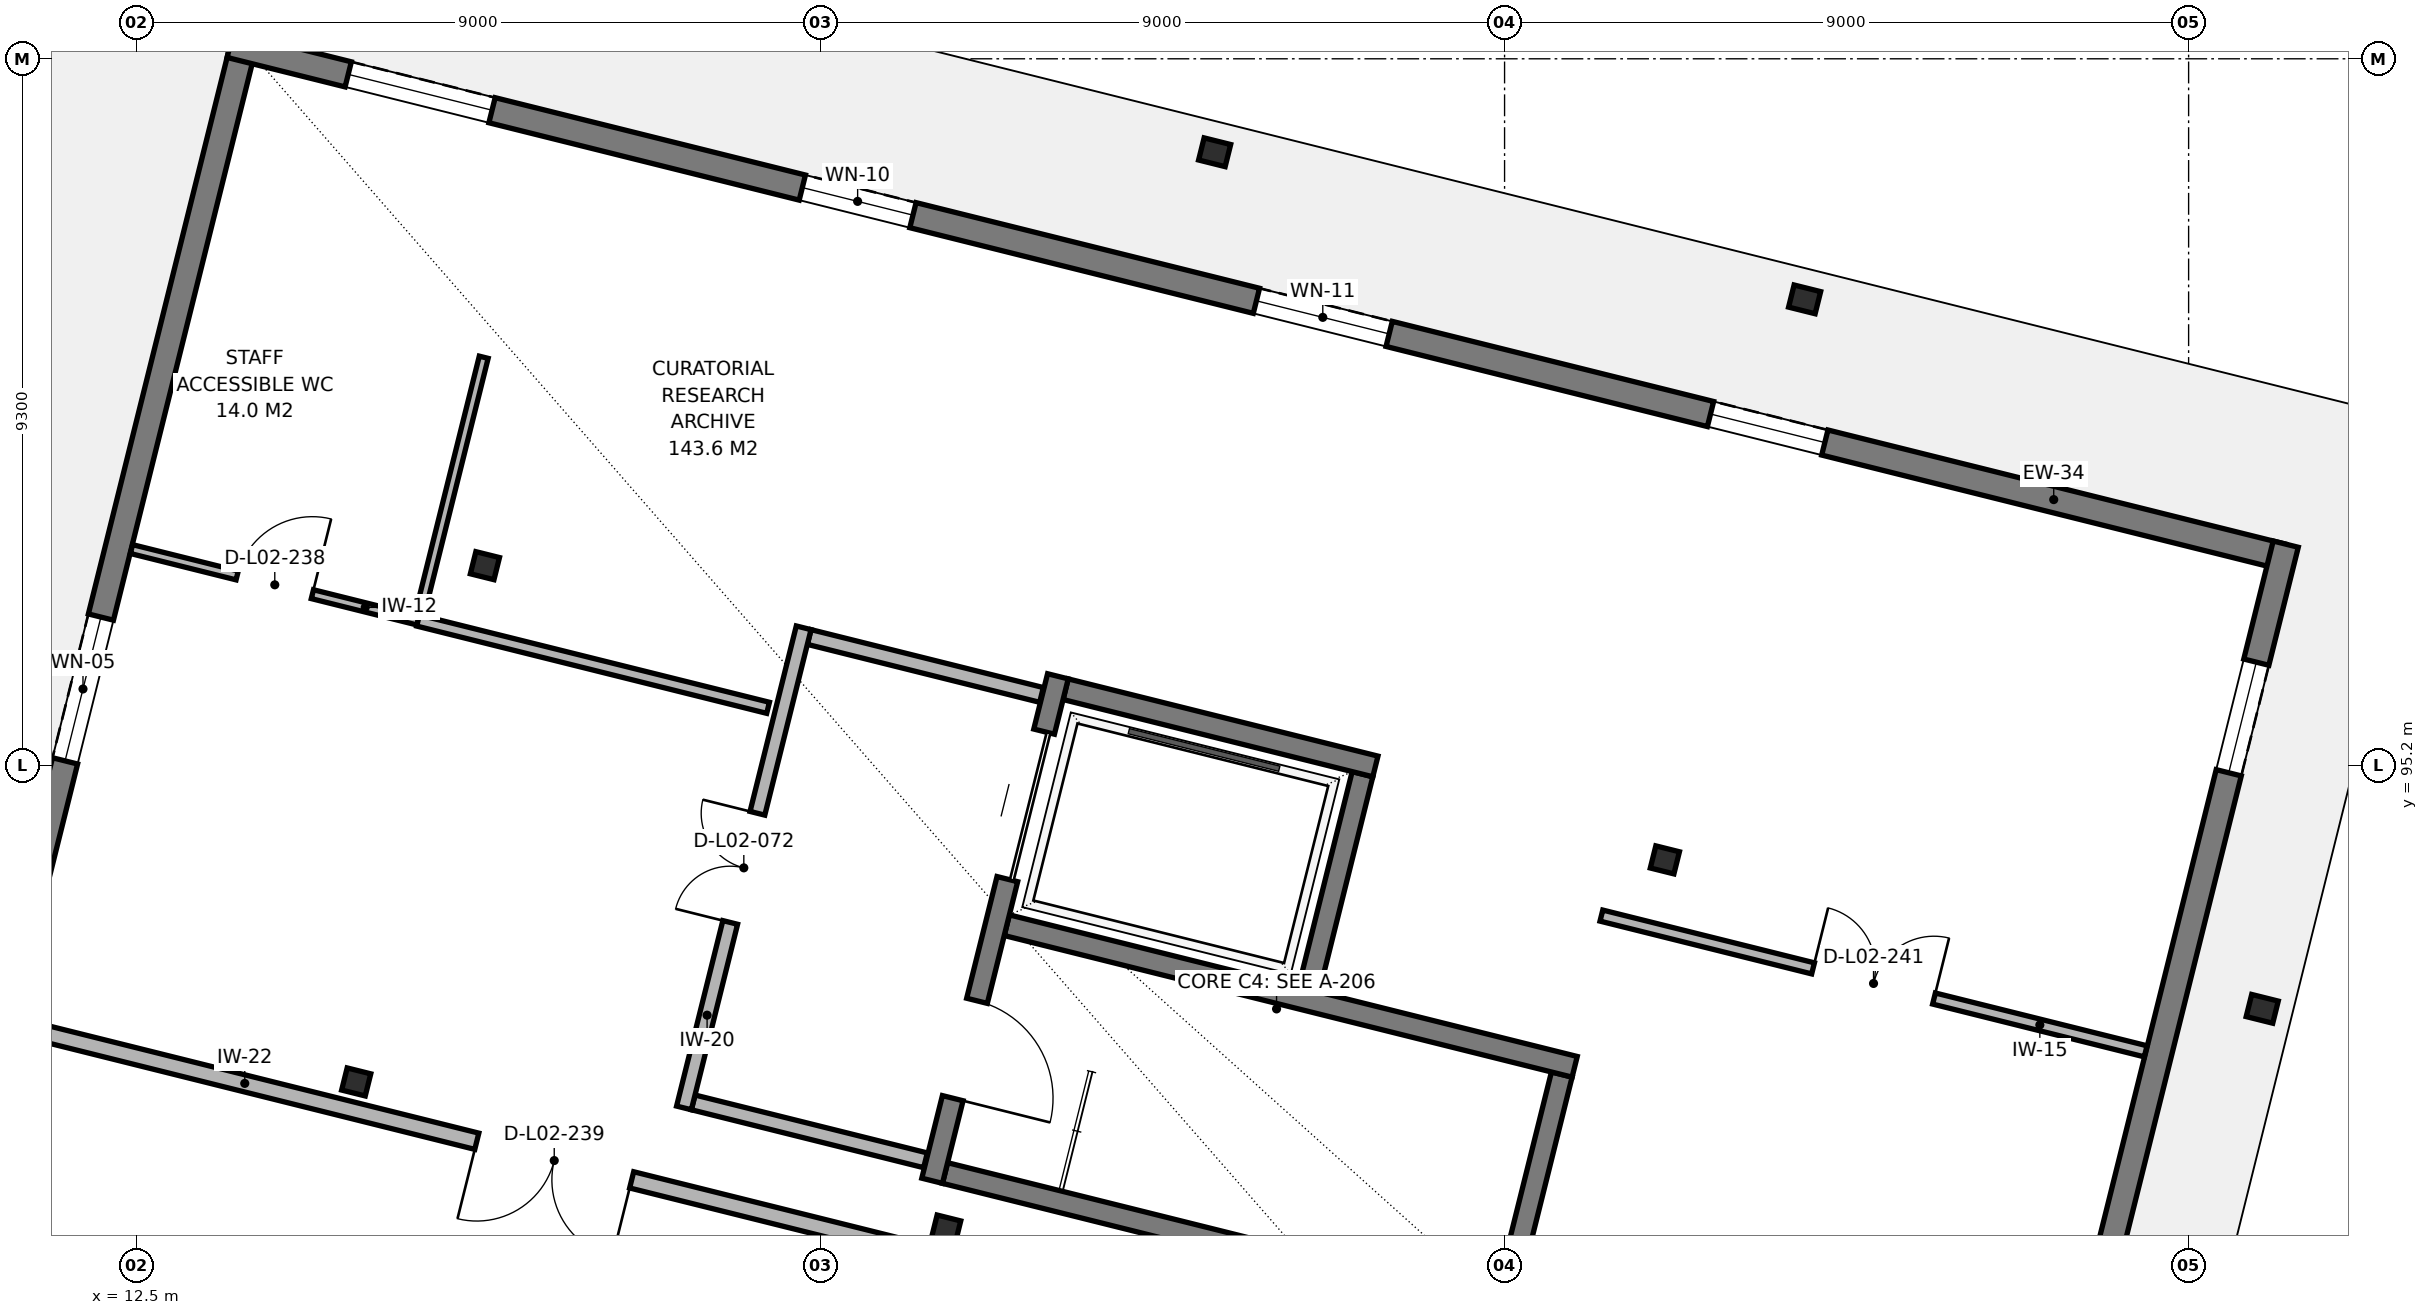
"""IFC4 building model, lengths in metres.
Left out: names, types, materials, properties, quantities, classifications, styles, units other than length and angle.
Written with IfcOpenShell. Run it as: python <this file> out.ifc"""

import sys

from ifc_helpers import new_model, si_unit, direction, frame, frame_2d, origin, origin_2d, place, context, subcontext, project, spatial, rectangle, i_section, extrude, element, fill, save


model = new_model("IFC4")
c1 = context("Model", 3, precision=1e-05, world=origin(), true_north=direction((0.0, 1.0)))
c2 = subcontext(c1, "Body", "Model", "MODEL_VIEW")
j1 = project(units=[si_unit("LENGTHUNIT", "METRE"), si_unit("PLANEANGLEUNIT", "RADIAN")], contexts=[c1])
p1 = place(None, origin())
s1 = spatial("IfcSite", under=j1, at=p1, CompositionType="ELEMENT")
p2 = place(p1, origin())
s2 = spatial("IfcBuilding", under=s1, at=p2, CompositionType="ELEMENT")
p3 = place(p2, frame((0.0, 0.0, 9.52)))
s3 = spatial("IfcBuildingStorey", under=s2, at=p3, CompositionType="ELEMENT", Elevation=9.52)
for number, where, z_axis, x_axis in (
    (1, (15.391, 91.039, 0.0), (0.0, 0.0, 1.0), (0.97, -0.242, 0.0)),
    (2, (17.084, 97.831, 0.0), (0.0, 0.0, 1.0), (0.97, -0.242, 0.0)),
    (3, (23.153, 89.104, 0.0), (0.0, 0.0, 1.0), (0.97, -0.242, 0.0)),
):
    element("IfcColumn", number, at=place(p3, frame(where, z_axis=z_axis, x_axis=x_axis)), inside=s3, PredefinedType="COLUMN", context=c2, shape_type="SweptSolid", body=[
        extrude(i_section(OverallWidth=0.3, OverallDepth=0.32, WebThickness=0.011, FlangeThickness=0.021, FilletRadius=0.027, at=origin_2d()), origin(), (0.0, 0.0, 1.0), 4.16),
    ])
p4 = place(p3, frame((26.685, 103.27, 0.0), z_axis=(0.0, 0.0, 1.0), x_axis=(0.970295726276, -0.2419218956, 0.0)))
e4 = element("IfcColumn", 4, at=p4, inside=s3, PredefinedType="COLUMN", context=c2, shape_type="SweptSolid", body=[
    extrude(i_section(OverallWidth=0.3, OverallDepth=0.36, WebThickness=0.012, FlangeThickness=0.022, FilletRadius=0.027, at=origin_2d()), origin(), (0.0, 0.0, 1.0), 4.16),
])
p5 = place(p3, frame((32.609, 93.961, 0.0), z_axis=(0.0, 0.0, 1.0), x_axis=(0.970295726276, -0.2419218956, 0.0)))
e5 = element("IfcColumn", 5, at=p5, inside=s3, PredefinedType="COLUMN", context=c2, shape_type="SweptSolid", body=[
    extrude(i_section(OverallWidth=0.3, OverallDepth=0.32, WebThickness=0.011, FlangeThickness=0.021, FilletRadius=0.027, at=origin_2d()), origin(), (0.0, 0.0, 1.0), 4.16),
])
for number, where, z_axis, x_axis in (
    (6, (34.448, 101.335, 0.0), (0.0, 0.0, 1.0), (0.97, -0.242, 0.0)),
    (7, (40.469, 92.001, 0.0), (0.0, 0.0, 1.0), (0.97, -0.242, 0.0)),
):
    element("IfcColumn", number, at=place(p3, frame(where, z_axis=z_axis, x_axis=x_axis)), inside=s3, PredefinedType="COLUMN", context=c2, shape_type="SweptSolid", body=[
        extrude(i_section(OverallWidth=0.3, OverallDepth=0.36, WebThickness=0.012, FlangeThickness=0.022, FilletRadius=0.027, at=origin_2d()), origin(), (0.0, 0.0, 1.0), 4.16),
    ])
p6 = place(p3, frame((9.222, 85.885, 0.0), z_axis=(0.0, 0.0, 1.0), x_axis=(0.241917442557, 0.970296836533, 0.0)))
e8 = element("IfcWall", 8, at=p6, inside=s3, PredefinedType="SOLIDWALL", context=c2, shape_type="SweptSolid", body=[
    extrude(rectangle(XDim=19.33, YDim=0.34, at=frame_2d((9.665, 0.0))), origin(), (0.0, 0.0, 1.0), 3.92),
])
p7 = place(p6, frame((1.6, 0.0, 0.85)))
e9 = element("IfcOpeningElement", 9, at=p7, cuts=e8, PredefinedType="OPENING", context=c2, shape_type="SweptSolid", body=[
    extrude(rectangle(XDim=1.55, YDim=1.5, at=frame_2d((0.775, 0.75))), frame((0.0, 0.18, 0.0), z_axis=(0.0, -1.0, 0.0), x_axis=(1.0, 0.0, 0.0)), (0.0, 0.0, 1.0), 0.36),
])
p8 = place(p6, frame((9.665, 0.0, 0.85)))
e10 = element("IfcOpeningElement", 10, at=p8, cuts=e8, PredefinedType="OPENING", context=c2, shape_type="SweptSolid", body=[
    extrude(rectangle(XDim=1.95, YDim=1.5, at=frame_2d((0.975, 0.75))), frame((0.0, 0.18, 0.0), z_axis=(0.0, -1.0, 0.0), x_axis=(1.0, 0.0, 0.0)), (0.0, 0.0, 1.0), 0.36),
])
p9 = place(p3, frame((13.733, 104.682, 0.0), z_axis=(0.0, 0.0, 1.0), x_axis=(0.970296082692, -0.24192046609, 0.0)))
e11 = element("IfcWall", 11, at=p9, inside=s3, PredefinedType="SOLIDWALL", context=c2, shape_type="SweptSolid", body=[
    extrude(rectangle(XDim=27.83, YDim=0.34, at=frame_2d((13.915, 0.0))), origin(), (0.0, 0.0, 1.0), 3.92),
])
p10 = place(p9, frame((1.6, 0.0, 0.85)))
e12 = element("IfcOpeningElement", 12, at=p10, cuts=e11, PredefinedType="OPENING", context=c2, shape_type="SweptSolid", body=[
    extrude(rectangle(XDim=1.95, YDim=1.5, at=frame_2d((0.975, 0.75))), frame((0.0, 0.18, 0.0), z_axis=(0.0, -1.0, 0.0), x_axis=(1.0, 0.0, 0.0)), (0.0, 0.0, 1.0), 0.36),
])
p11 = place(p9, frame((7.758, 0.0, 0.85)))
e13 = element("IfcOpeningElement", 13, at=p11, cuts=e11, PredefinedType="OPENING", context=c2, shape_type="SweptSolid", body=[
    extrude(rectangle(XDim=1.5, YDim=1.7, at=frame_2d((0.75, 0.85))), frame((0.0, 0.18, 0.0), z_axis=(0.0, -1.0, 0.0), x_axis=(1.0, 0.0, 0.0)), (0.0, 0.0, 1.0), 0.36),
])
p12 = place(p9, frame((13.915, 0.0, 0.85)))
e14 = element("IfcOpeningElement", 14, at=p12, cuts=e11, PredefinedType="OPENING", context=c2, shape_type="SweptSolid", body=[
    extrude(rectangle(XDim=1.8, YDim=1.7, at=frame_2d((0.9, 0.85))), frame((0.0, 0.18, 0.0), z_axis=(0.0, -1.0, 0.0), x_axis=(1.0, 0.0, 0.0)), (0.0, 0.0, 1.0), 0.36),
])
p13 = place(p9, frame((20.073, 0.0, 0.85)))
e15 = element("IfcOpeningElement", 15, at=p13, cuts=e11, PredefinedType="OPENING", context=c2, shape_type="SweptSolid", body=[
    extrude(rectangle(XDim=1.55, YDim=1.5, at=frame_2d((0.775, 0.75))), frame((0.0, 0.18, 0.0), z_axis=(0.0, -1.0, 0.0), x_axis=(1.0, 0.0, 0.0)), (0.0, 0.0, 1.0), 0.36),
])
p14 = place(p3, frame((40.778, 98.115, 0.0), z_axis=(0.0, 0.0, 1.0), x_axis=(-0.241917442557, -0.970296836533, 0.0)))
e16 = element("IfcWall", 16, at=p14, inside=s3, PredefinedType="SOLIDWALL", context=c2, shape_type="SweptSolid", body=[
    extrude(rectangle(XDim=19.33, YDim=0.34, at=frame_2d((9.665, 0.0))), origin(), (0.0, 0.0, 1.0), 3.92),
])
p15 = place(p14, frame((1.6, 0.0, 0.85)))
e17 = element("IfcOpeningElement", 17, at=p15, cuts=e16, PredefinedType="OPENING", context=c2, shape_type="SweptSolid", body=[
    extrude(rectangle(XDim=1.5, YDim=1.7, at=frame_2d((0.75, 0.85))), frame((0.0, 0.18, 0.0), z_axis=(0.0, -1.0, 0.0), x_axis=(1.0, 0.0, 0.0)), (0.0, 0.0, 1.0), 0.36),
])
p16 = place(p14, frame((9.665, 0.0, 0.85)))
e18 = element("IfcOpeningElement", 18, at=p16, cuts=e16, PredefinedType="OPENING", context=c2, shape_type="SweptSolid", body=[
    extrude(rectangle(XDim=1.8, YDim=1.7, at=frame_2d((0.9, 0.85))), frame((0.0, 0.18, 0.0), z_axis=(0.0, -1.0, 0.0), x_axis=(1.0, 0.0, 0.0)), (0.0, 0.0, 1.0), 0.36),
])
p17 = place(p3, frame((23.138, 89.841, 0.0), z_axis=(0.0, 0.0, 1.0), x_axis=(0.970295246537, -0.24192381972, 0.0)))
e19 = element("IfcWall", 19, at=p17, inside=s3, PredefinedType="SHEAR", context=c2, shape_type="SweptSolid", body=[
    extrude(rectangle(XDim=7.7, YDim=0.28, at=frame_2d((3.85, 0.0))), origin(), (0.0, 0.0, 1.0), 3.92),
])
p18 = place(p3, frame((30.508, 88.148, 0.0), z_axis=(0.0, 0.0, 1.0), x_axis=(0.241920098373, 0.970296174373, 0.0)))
e20 = element("IfcWall", 20, at=p18, inside=s3, PredefinedType="SHEAR", context=c2, shape_type="SweptSolid", body=[
    extrude(rectangle(XDim=3.08, YDim=0.28, at=frame_2d((1.54, 0.0))), origin(), (0.0, 0.0, 1.0), 3.92),
])
p19 = place(p3, frame((31.422, 91.239, 0.0), z_axis=(0.0, 0.0, 1.0), x_axis=(-0.970297102167, 0.241916377137, 0.0)))
e21 = element("IfcWall", 21, at=p19, inside=s3, PredefinedType="SHEAR", context=c2, shape_type="SweptSolid", body=[
    extrude(rectangle(XDim=7.7, YDim=0.28, at=frame_2d((3.85, 0.0))), origin(), (0.0, 0.0, 1.0), 3.92),
])
p20 = place(p3, frame((27.924, 92.255, 0.0), z_axis=(0.0, 0.0, 1.0), x_axis=(0.241886356621, 0.970304586447, 0.0)))
e22 = element("IfcWall", 22, at=p20, inside=s3, PredefinedType="SHEAR", context=c2, shape_type="SweptSolid", body=[
    extrude(rectangle(XDim=2.92, YDim=0.28, at=frame_2d((1.46, 0.0))), origin(), (0.0, 0.0, 1.0), 3.92),
])
p21 = place(p3, frame((28.8, 95.19, 0.0), z_axis=(0.0, 0.0, 1.0), x_axis=(-0.970292765557, 0.241933770084, 0.0)))
e23 = element("IfcWall", 23, at=p21, inside=s3, PredefinedType="SHEAR", context=c2, shape_type="SweptSolid", body=[
    extrude(rectangle(XDim=4.2, YDim=0.28, at=frame_2d((2.1, 0.0))), origin(), (0.0, 0.0, 1.0), 3.92),
])
p22 = place(p3, frame((24.623, 96.376, 0.0), z_axis=(0.0, 0.0, 1.0), x_axis=(-0.241922508616, -0.970295573434, 0.0)))
e24 = element("IfcWall", 24, at=p22, inside=s3, PredefinedType="SHEAR", context=c2, shape_type="SweptSolid", body=[
    extrude(rectangle(XDim=6.84, YDim=0.28, at=frame_2d((3.42, 0.0))), origin(), (0.0, 0.0, 1.0), 3.92),
])
p23 = place(p22, frame((0.75, 0.0, 0.0)))
e25 = element("IfcOpeningElement", 25, at=p23, cuts=e24, PredefinedType="OPENING", context=c2, shape_type="SweptSolid", body=[
    extrude(rectangle(XDim=2.0, YDim=2.3, at=frame_2d((1.0, 1.15))), frame((0.0, 0.15, 0.0), z_axis=(0.0, -1.0, 0.0), x_axis=(1.0, 0.0, 0.0)), (0.0, 0.0, 1.0), 0.3),
])
p24 = place(p22, frame((4.4, 0.0, 0.0)))
e26 = element("IfcOpeningElement", 26, at=p24, cuts=e24, PredefinedType="OPENING", context=c2, shape_type="SweptSolid", body=[
    extrude(rectangle(XDim=1.32, YDim=2.12, at=frame_2d((0.66, 1.06))), frame((0.0, 0.15, 0.0), z_axis=(0.0, -1.0, 0.0), x_axis=(1.0, 0.0, 0.0)), (0.0, 0.0, 1.0), 0.3),
])
p25 = place(p3, frame((19.824, 90.77, 0.0), z_axis=(0.0, 0.0, 1.0), x_axis=(0.970306396763, -0.241879094592, 0.0)))
e27 = element("IfcWall", 27, at=p25, inside=s3, PredefinedType="PARTITIONING", context=c2, shape_type="SweptSolid", body=[
    extrude(rectangle(XDim=3.15, YDim=0.2, at=frame_2d((1.575, 0.0))), origin(), (0.0, 0.0, 1.0), 3.92),
])
p26 = place(p3, frame((24.407, 96.131, 0.0), z_axis=(0.0, 0.0, 1.0), x_axis=(-0.970301862046, 0.241897285042, 0.0)))
e28 = element("IfcWall", 28, at=p26, inside=s3, PredefinedType="PARTITIONING", context=c2, shape_type="SweptSolid", body=[
    extrude(rectangle(XDim=3.15, YDim=0.2, at=frame_2d((1.575, 0.0))), origin(), (0.0, 0.0, 1.0), 3.41),
])
p27 = place(p3, frame((19.703, 90.698, 0.0), z_axis=(0.0, 0.0, 1.0), x_axis=(0.24192671796, 0.970294523914, 0.0)))
e29 = element("IfcWall", 29, at=p27, inside=s3, PredefinedType="PARTITIONING", context=c2, shape_type="SweptSolid", body=[
    extrude(rectangle(XDim=6.51, YDim=0.2, at=frame_2d((3.255, 0.0))), origin(), (0.0, 0.0, 1.0), 3.41),
])
p28 = place(p27, frame((2.515, 0.0, 0.0)))
e30 = element("IfcOpeningElement", 30, at=p28, cuts=e29, PredefinedType="OPENING", context=c2, shape_type="SweptSolid", body=[
    extrude(rectangle(XDim=1.48, YDim=2.15, at=frame_2d((0.74, 1.075))), frame((0.0, 0.11, 0.0), z_axis=(0.0, -1.0, 0.0), x_axis=(1.0, 0.0, 0.0)), (0.0, 0.0, 1.0), 0.22),
])
p29 = place(p3, frame((12.434, 98.05, 0.0), z_axis=(0.0, 0.0, 1.0), x_axis=(0.970290146649, -0.241944273164, 0.0)))
e31 = element("IfcWall", 31, at=p29, inside=s3, PredefinedType="PARTITIONING", context=c2, shape_type="SweptSolid", body=[
    extrude(rectangle(XDim=3.886, YDim=0.12, at=frame_2d((1.943, 0.0))), origin(), (0.0, 0.0, 1.0), 3.91),
])
p30 = place(p29, frame((1.433, 0.0, 0.0)))
e32 = element("IfcOpeningElement", 32, at=p30, cuts=e31, PredefinedType="OPENING", context=c2, shape_type="SweptSolid", body=[
    extrude(rectangle(XDim=1.02, YDim=2.12, at=frame_2d((0.51, 1.06))), frame((0.0, 0.07, 0.0), z_axis=(0.0, -1.0, 0.0), x_axis=(1.0, 0.0, 0.0)), (0.0, 0.0, 1.0), 0.14),
])
p31 = place(p3, frame((25.121, 88.229, 0.0), z_axis=(0.0, 0.0, 1.0), x_axis=(-0.970293882598, 0.241929290069, 0.0)))
e33 = element("IfcWall", 33, at=p31, inside=s3, PredefinedType="PARTITIONING", context=c2, shape_type="SweptSolid", body=[
    extrude(rectangle(XDim=14.686, YDim=0.22, at=frame_2d((7.343, 0.0))), origin(), (0.0, 0.0, 1.0), 3.46),
])
p32 = place(p31, frame((6.293, 0.0, 0.0)))
e34 = element("IfcOpeningElement", 34, at=p32, cuts=e33, PredefinedType="OPENING", context=c2, shape_type="SweptSolid", body=[
    extrude(rectangle(XDim=2.1, YDim=2.25, at=frame_2d((1.05, 1.125))), frame((0.0, 0.12, 0.0), z_axis=(0.0, -1.0, 0.0), x_axis=(1.0, 0.0, 0.0)), (0.0, 0.0, 1.0), 0.24),
])
p33 = place(p3, frame((31.774, 93.228, 0.0), z_axis=(0.0, 0.0, 1.0), x_axis=(0.970297970166, -0.241912895671, 0.0)))
e35 = element("IfcWall", 35, at=p33, inside=s3, PredefinedType="PARTITIONING", context=c2, shape_type="SweptSolid", body=[
    extrude(rectangle(XDim=7.38, YDim=0.15, at=frame_2d((3.69, 0.0))), origin(), (0.0, 0.0, 1.0), 3.46),
])
p34 = place(p33, frame((2.87, 0.0, 0.0)))
e36 = element("IfcOpeningElement", 36, at=p34, cuts=e35, PredefinedType="OPENING", context=c2, shape_type="SweptSolid", body=[
    extrude(rectangle(XDim=1.64, YDim=2.2, at=frame_2d((0.82, 1.1))), frame((0.0, 0.085, 0.0), z_axis=(0.0, -1.0, 0.0), x_axis=(1.0, 0.0, 0.0)), (0.0, 0.0, 1.0), 0.17),
])
p35 = place(p3, frame((16.205, 97.11, 0.0), z_axis=(0.0, 0.0, 1.0), x_axis=(0.970293610537, -0.241930381208, 0.0)))
e37 = element("IfcWall", 37, at=p35, inside=s3, PredefinedType="PARTITIONING", context=c2, shape_type="SweptSolid", body=[
    extrude(rectangle(XDim=4.746, YDim=0.15, at=frame_2d((2.373, 0.0))), origin(), (0.0, 0.0, 1.0), 3.46),
])
p36 = place(p3, frame((17.069, 100.573, 0.0), z_axis=(0.0, 0.0, 1.0), x_axis=(-0.241976747044, -0.970282048628, 0.0)))
e38 = element("IfcWall", 38, at=p36, inside=s3, PredefinedType="PARTITIONING", context=c2, shape_type="SweptSolid", body=[
    extrude(rectangle(XDim=3.495, YDim=0.12, at=frame_2d((1.748, 0.0))), origin(), (0.0, 0.0, 1.0), 3.41),
])
p37 = place(p8, origin())
e39 = element("IfcWindow", 39, at=p37, inside=s3, PartitioningType="SINGLE_PANEL", PredefinedType="WINDOW", context=c2, shape_type="SweptSolid", body=[
    extrude(rectangle(XDim=1.95, YDim=1.5, at=frame_2d((0.975, 0.75))), frame((0.0, 0.03, 0.0), z_axis=(0.0, -1.0, 0.0), x_axis=(1.0, 0.0, 0.0)), (0.0, 0.0, 1.0), 0.06),
])
fill(e10, e39)
p38 = place(p10, origin())
e40 = element("IfcWindow", 40, at=p38, inside=s3, PartitioningType="SINGLE_PANEL", PredefinedType="WINDOW", context=c2, shape_type="SweptSolid", body=[
    extrude(rectangle(XDim=1.95, YDim=1.5, at=frame_2d((0.975, 0.75))), frame((0.0, 0.03, 0.0), z_axis=(0.0, -1.0, 0.0), x_axis=(1.0, 0.0, 0.0)), (0.0, 0.0, 1.0), 0.06),
])
fill(e12, e40)
p39 = place(p11, origin())
e41 = element("IfcWindow", 41, at=p39, inside=s3, PartitioningType="SINGLE_PANEL", PredefinedType="WINDOW", context=c2, shape_type="SweptSolid", body=[
    extrude(rectangle(XDim=1.5, YDim=1.7, at=frame_2d((0.75, 0.85))), frame((0.0, 0.03, 0.0), z_axis=(0.0, -1.0, 0.0), x_axis=(1.0, 0.0, 0.0)), (0.0, 0.0, 1.0), 0.06),
])
fill(e13, e41)
p40 = place(p12, origin())
e42 = element("IfcWindow", 42, at=p40, inside=s3, PartitioningType="SINGLE_PANEL", PredefinedType="WINDOW", context=c2, shape_type="SweptSolid", body=[
    extrude(rectangle(XDim=1.8, YDim=1.7, at=frame_2d((0.9, 0.85))), frame((0.0, 0.03, 0.0), z_axis=(0.0, -1.0, 0.0), x_axis=(1.0, 0.0, 0.0)), (0.0, 0.0, 1.0), 0.06),
])
fill(e14, e42)
p41 = place(p13, origin())
e43 = element("IfcWindow", 43, at=p41, inside=s3, PartitioningType="SINGLE_PANEL", PredefinedType="WINDOW", context=c2, shape_type="SweptSolid", body=[
    extrude(rectangle(XDim=1.55, YDim=1.5, at=frame_2d((0.775, 0.75))), frame((0.0, 0.03, 0.0), z_axis=(0.0, -1.0, 0.0), x_axis=(1.0, 0.0, 0.0)), (0.0, 0.0, 1.0), 0.06),
])
fill(e15, e43)
p42 = place(p15, origin())
e44 = element("IfcWindow", 44, at=p42, inside=s3, PartitioningType="SINGLE_PANEL", PredefinedType="WINDOW", context=c2, shape_type="SweptSolid", body=[
    extrude(rectangle(XDim=1.5, YDim=1.7, at=frame_2d((0.75, 0.85))), frame((0.0, 0.03, 0.0), z_axis=(0.0, -1.0, 0.0), x_axis=(1.0, 0.0, 0.0)), (0.0, 0.0, 1.0), 0.06),
])
fill(e17, e44)
p43 = place(p23, origin())
e45 = element("IfcDoor", 45, at=p43, inside=s3, OperationType="SLIDING_TO_LEFT", PredefinedType="DOOR", context=c2, shape_type="SweptSolid", body=[
    extrude(rectangle(XDim=2.0, YDim=2.3, at=frame_2d((1.0, 1.15))), frame((0.0, 0.025, 0.0), z_axis=(0.0, -1.0, 0.0), x_axis=(1.0, 0.0, 0.0)), (0.0, 0.0, 1.0), 0.05),
])
fill(e25, e45)
p44 = place(p24, origin())
e46 = element("IfcDoor", 46, at=p44, inside=s3, OperationType="SINGLE_SWING_RIGHT", PredefinedType="DOOR", context=c2, shape_type="SweptSolid", body=[
    extrude(rectangle(XDim=1.32, YDim=2.12, at=frame_2d((0.66, 1.06))), frame((0.0, 0.025, 0.0), z_axis=(0.0, -1.0, 0.0), x_axis=(1.0, 0.0, 0.0)), (0.0, 0.0, 1.0), 0.05),
])
fill(e26, e46)
p45 = place(p28, origin())
e47 = element("IfcDoor", 47, at=p45, inside=s3, OperationType="DOUBLE_DOOR_SINGLE_SWING", PredefinedType="DOOR", context=c2, shape_type="SweptSolid", body=[
    extrude(rectangle(XDim=1.48, YDim=2.15, at=frame_2d((0.74, 1.075))), frame((0.0, 0.025, 0.0), z_axis=(0.0, -1.0, 0.0), x_axis=(1.0, 0.0, 0.0)), (0.0, 0.0, 1.0), 0.05),
])
fill(e30, e47)
p46 = place(p30, origin())
e48 = element("IfcDoor", 48, at=p46, inside=s3, OperationType="SINGLE_SWING_RIGHT", PredefinedType="DOOR", context=c2, shape_type="SweptSolid", body=[
    extrude(rectangle(XDim=1.02, YDim=2.12, at=frame_2d((0.51, 1.06))), frame((0.0, 0.025, 0.0), z_axis=(0.0, -1.0, 0.0), x_axis=(1.0, 0.0, 0.0)), (0.0, 0.0, 1.0), 0.05),
])
fill(e32, e48)
p47 = place(p32, origin())
e49 = element("IfcDoor", 49, at=p47, inside=s3, OperationType="DOUBLE_DOOR_SINGLE_SWING", PredefinedType="DOOR", context=c2, shape_type="SweptSolid", body=[
    extrude(rectangle(XDim=2.1, YDim=2.25, at=frame_2d((1.05, 1.125))), frame((0.0, 0.025, 0.0), z_axis=(0.0, -1.0, 0.0), x_axis=(1.0, 0.0, 0.0)), (0.0, 0.0, 1.0), 0.05),
])
fill(e34, e49)
p48 = place(p34, origin())
e50 = element("IfcDoor", 50, at=p48, inside=s3, OperationType="DOUBLE_DOOR_SINGLE_SWING", PredefinedType="DOOR", context=c2, shape_type="SweptSolid", body=[
    extrude(rectangle(XDim=1.64, YDim=2.2, at=frame_2d((0.82, 1.1))), frame((0.0, 0.025, 0.0), z_axis=(0.0, -1.0, 0.0), x_axis=(1.0, 0.0, 0.0)), (0.0, 0.0, 1.0), 0.05),
])
fill(e36, e50)
save(model, sys.argv[1])
